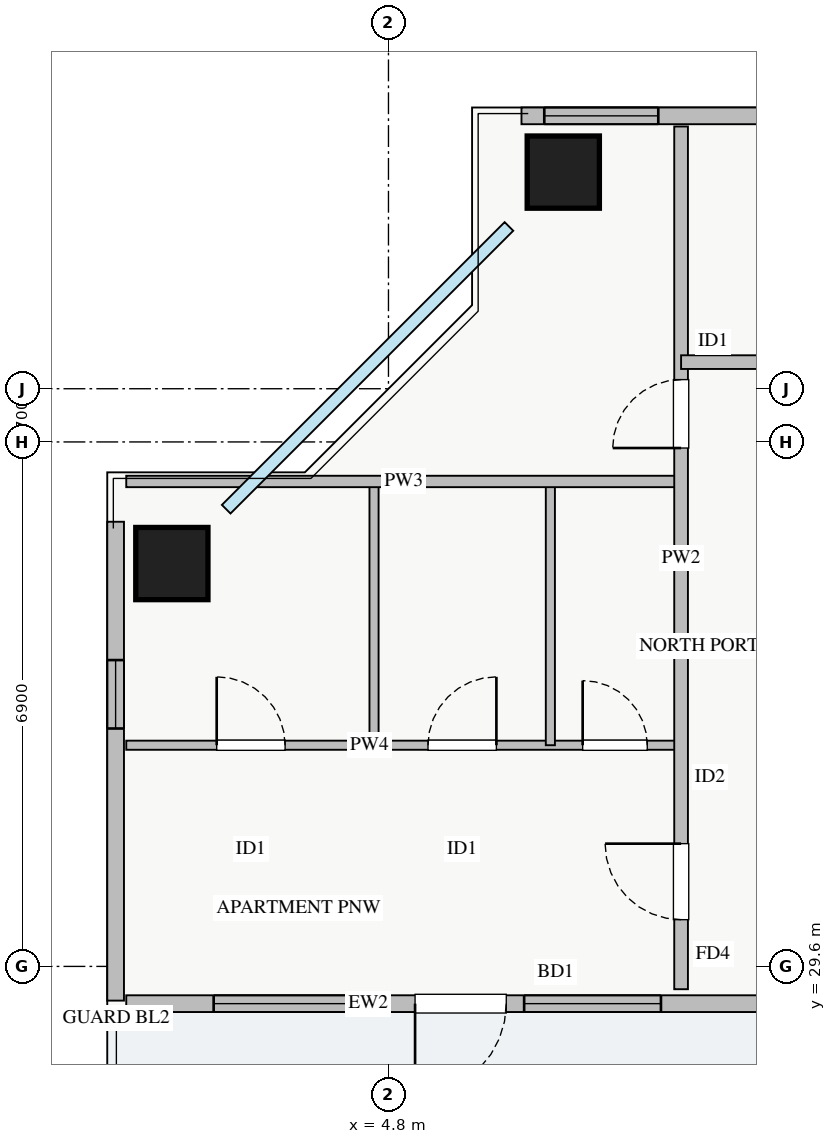
"""IFC4 building model, lengths in metres.
Left out: names, types, materials, properties, quantities, classifications, styles, units other than length and angle.
Written with IfcOpenShell. Run it as: python <this file> out.ifc"""

import sys

from ifc_helpers import new_model, si_unit, direction, frame, frame_2d, origin, origin_2d, place, context, subcontext, project, spatial, rectangle, extrude, source, transform, mapped, element, fill, save


model = new_model("IFC4")
c1 = context("Model", 3, precision=1e-05, world=origin(), true_north=direction((0.0, 1.0)))
c2 = subcontext(c1, "Body", "Model", "MODEL_VIEW")
j1 = project(units=[si_unit("LENGTHUNIT", "METRE"), si_unit("PLANEANGLEUNIT", "RADIAN")], contexts=[c1])
p1 = place(None, origin())
s1 = spatial("IfcSite", under=j1, at=p1, CompositionType="ELEMENT")
p2 = place(p1, origin())
s2 = spatial("IfcBuilding", under=s1, at=p2, CompositionType="ELEMENT")
p3 = place(p2, frame((0.0, 0.0, 153.5)))
s3 = spatial("IfcBuildingStorey", under=s2, at=p3, CompositionType="ELEMENT", Elevation=153.5)
m1 = source(origin(), c2, "Body", "SweptSolid", [
    extrude(rectangle(XDim=0.95, YDim=0.95, at=origin_2d()), origin(), (0.0, 0.0, 1.0), 3.25),
])
for number, where, z_axis, x_axis in (
    (1, (7.1, 40.05, 0.0), (0.0, 0.0, 1.0), (1.0, 0.0, 0.0)),
    (2, (1.95, 34.9, 0.0), (0.0, 0.0, 1.0), (1.0, 0.0, 0.0)),
):
    element("IfcColumn", number, at=place(p3, frame(where, z_axis=z_axis, x_axis=x_axis)), inside=s3, PredefinedType="COLUMN", context=c2, shape_type="MappedRepresentation", body=[
        mapped(m1, transform((0.0, 0.0, 0.0), x_axis=(1.0, 0.0, 0.0), y_axis=(0.0, 1.0, 0.0), z_axis=(0.0, 0.0, 1.0), scale=1.0)),
    ])
p4 = place(p3, frame((1.35, 29.11, 0.0), z_axis=(0.0, 0.0, 1.0), x_axis=(1.0, 0.0, 0.0)))
e3 = element("IfcWall", 3, at=p4, inside=s3, PredefinedType="STANDARD", context=c2, shape_type="SweptSolid", body=[
    extrude(rectangle(XDim=8.87, YDim=0.22, at=frame_2d((4.435, 0.0))), origin(), (0.0, 0.0, 1.0), 2.61),
])
p5 = place(p4, frame((3.8, 0.0, 0.0)))
e4 = element("IfcOpeningElement", 4, at=p5, cuts=e3, PredefinedType="OPENING", context=c2, shape_type="SweptSolid", body=[
    extrude(rectangle(XDim=1.2, YDim=2.1, at=frame_2d((0.6, 1.05))), frame((0.0, 0.12, 0.0), z_axis=(0.0, -1.0, 0.0), x_axis=(1.0, 0.0, 0.0)), (0.0, 0.0, 1.0), 0.24),
])
p6 = place(p4, frame((1.15, 0.0, 0.9)))
e5 = element("IfcOpeningElement", 5, at=p6, cuts=e3, PredefinedType="OPENING", context=c2, shape_type="SweptSolid", body=[
    extrude(rectangle(XDim=2.1, YDim=1.48, at=frame_2d((1.05, 0.74))), frame((0.0, 0.12, 0.0), z_axis=(0.0, -1.0, 0.0), x_axis=(1.0, 0.0, 0.0)), (0.0, 0.0, 1.0), 0.24),
])
p7 = place(p4, frame((5.235, 0.0, 0.9)))
e6 = element("IfcOpeningElement", 6, at=p7, cuts=e3, PredefinedType="OPENING", context=c2, shape_type="SweptSolid", body=[
    extrude(rectangle(XDim=1.8, YDim=1.5, at=frame_2d((0.9, 0.75))), frame((0.0, 0.12, 0.0), z_axis=(0.0, -1.0, 0.0), x_axis=(1.0, 0.0, 0.0)), (0.0, 0.0, 1.0), 0.24),
])
p8 = place(p3, frame((1.21, 29.15, 0.0), z_axis=(0.0, 0.0, 1.0), x_axis=(0.0, 1.0, 0.0)))
e7 = element("IfcWall", 7, at=p8, inside=s3, PredefinedType="STANDARD", context=c2, shape_type="SweptSolid", body=[
    extrude(rectangle(XDim=6.3, YDim=0.22, at=frame_2d((3.15, 0.0))), origin(), (0.0, 0.0, 1.0), 2.61),
])
p9 = place(p8, frame((3.58, 0.0, 0.9)))
e8 = element("IfcOpeningElement", 8, at=p9, cuts=e7, PredefinedType="OPENING", context=c2, shape_type="SweptSolid", body=[
    extrude(rectangle(XDim=0.9, YDim=1.2, at=frame_2d((0.45, 0.6))), frame((0.0, 0.12, 0.0), z_axis=(0.0, -1.0, 0.0), x_axis=(1.0, 0.0, 0.0)), (0.0, 0.0, 1.0), 0.24),
])
p10 = place(p3, frame((6.55, 40.79, 0.0), z_axis=(0.0, 0.0, 1.0), x_axis=(1.0, 0.0, 0.0)))
e9 = element("IfcWall", 9, at=p10, inside=s3, PredefinedType="STANDARD", context=c2, shape_type="SweptSolid", body=[
    extrude(rectangle(XDim=24.9, YDim=0.22, at=frame_2d((12.45, 0.0))), origin(), (0.0, 0.0, 1.0), 2.61),
])
p11 = place(p10, frame((0.3, 0.0, 0.9)))
e10 = element("IfcOpeningElement", 10, at=p11, cuts=e9, PredefinedType="OPENING", context=c2, shape_type="SweptSolid", body=[
    extrude(rectangle(XDim=1.5, YDim=1.5, at=frame_2d((0.75, 0.75))), frame((0.0, 0.12, 0.0), z_axis=(0.0, -1.0, 0.0), x_axis=(1.0, 0.0, 0.0)), (0.0, 0.0, 1.0), 0.24),
])
p12 = place(p10, frame((8.438, 0.0, 0.9)))
e11 = element("IfcOpeningElement", 11, at=p12, cuts=e9, PredefinedType="OPENING", context=c2, shape_type="SweptSolid", body=[
    extrude(rectangle(XDim=1.8, YDim=1.45, at=frame_2d((0.9, 0.725))), frame((0.0, 0.12, 0.0), z_axis=(0.0, -1.0, 0.0), x_axis=(1.0, 0.0, 0.0)), (0.0, 0.0, 1.0), 0.24),
])
p13 = place(p10, frame((14.813, 0.0, 0.9)))
e12 = element("IfcOpeningElement", 12, at=p13, cuts=e9, PredefinedType="OPENING", context=c2, shape_type="SweptSolid", body=[
    extrude(rectangle(XDim=1.5, YDim=1.45, at=frame_2d((0.75, 0.725))), frame((0.0, 0.12, 0.0), z_axis=(0.0, -1.0, 0.0), x_axis=(1.0, 0.0, 0.0)), (0.0, 0.0, 1.0), 0.24),
])
p14 = place(p10, frame((20.738, 0.0, 0.9)))
e13 = element("IfcOpeningElement", 13, at=p14, cuts=e9, PredefinedType="OPENING", context=c2, shape_type="SweptSolid", body=[
    extrude(rectangle(XDim=2.1, YDim=1.48, at=frame_2d((1.05, 0.74))), frame((0.0, 0.12, 0.0), z_axis=(0.0, -1.0, 0.0), x_axis=(1.0, 0.0, 0.0)), (0.0, 0.0, 1.0), 0.24),
])
p15 = place(p10, frame((4.094, 0.0, 0.9)))
e14 = element("IfcOpeningElement", 14, at=p15, cuts=e9, PredefinedType="OPENING", context=c2, shape_type="SweptSolid", body=[
    extrude(rectangle(XDim=2.4, YDim=1.5, at=frame_2d((1.2, 0.75))), frame((0.0, 0.12, 0.0), z_axis=(0.0, -1.0, 0.0), x_axis=(1.0, 0.0, 0.0)), (0.0, 0.0, 1.0), 0.24),
])
p16 = place(p3, frame((1.35, 32.51, 0.0), z_axis=(0.0, 0.0, 1.0), x_axis=(1.0, 0.0, 0.0)))
e15 = element("IfcWall", 15, at=p16, inside=s3, PredefinedType="PLUMBINGWALL", context=c2, shape_type="SweptSolid", body=[
    extrude(rectangle(XDim=7.3, YDim=0.12, at=frame_2d((3.65, 0.0))), origin(), (0.0, 0.0, 1.0), 3.07),
])
p17 = place(p16, frame((1.19, 0.0, 0.0)))
e16 = element("IfcOpeningElement", 16, at=p17, cuts=e15, PredefinedType="OPENING", context=c2, shape_type="SweptSolid", body=[
    extrude(rectangle(XDim=0.9, YDim=2.05, at=frame_2d((0.45, 1.025))), frame((0.0, 0.07, 0.0), z_axis=(0.0, -1.0, 0.0), x_axis=(1.0, 0.0, 0.0)), (0.0, 0.0, 1.0), 0.14),
])
p18 = place(p16, frame((3.97, 0.0, 0.0)))
e17 = element("IfcOpeningElement", 17, at=p18, cuts=e15, PredefinedType="OPENING", context=c2, shape_type="SweptSolid", body=[
    extrude(rectangle(XDim=0.9, YDim=2.05, at=frame_2d((0.45, 1.025))), frame((0.0, 0.07, 0.0), z_axis=(0.0, -1.0, 0.0), x_axis=(1.0, 0.0, 0.0)), (0.0, 0.0, 1.0), 0.14),
])
p19 = place(p16, frame((6.005, 0.0, 0.0)))
e18 = element("IfcOpeningElement", 18, at=p19, cuts=e15, PredefinedType="OPENING", context=c2, shape_type="SweptSolid", body=[
    extrude(rectangle(XDim=0.85, YDim=2.05, at=frame_2d((0.425, 1.025))), frame((0.0, 0.07, 0.0), z_axis=(0.0, -1.0, 0.0), x_axis=(1.0, 0.0, 0.0)), (0.0, 0.0, 1.0), 0.14),
])
p20 = place(p3, frame((4.61, 32.51, 0.0), z_axis=(0.0, 0.0, 1.0), x_axis=(0.0, 1.0, 0.0)))
e19 = element("IfcWall", 19, at=p20, inside=s3, PredefinedType="PLUMBINGWALL", context=c2, shape_type="SweptSolid", body=[
    extrude(rectangle(XDim=3.47, YDim=0.12, at=frame_2d((1.735, 0.0))), origin(), (0.0, 0.0, 1.0), 3.07),
])
p21 = place(p3, frame((6.93, 32.51, 0.0), z_axis=(0.0, 0.0, 1.0), x_axis=(0.0, 1.0, 0.0)))
e20 = element("IfcWall", 20, at=p21, inside=s3, PredefinedType="PLUMBINGWALL", context=c2, shape_type="SweptSolid", body=[
    extrude(rectangle(XDim=3.47, YDim=0.12, at=frame_2d((1.735, 0.0))), origin(), (0.0, 0.0, 1.0), 2.577),
])
p22 = place(p3, frame((1.35, 35.98, 0.0), z_axis=(0.0, 0.0, 1.0), x_axis=(1.0, 0.0, 0.0)))
e21 = element("IfcWall", 21, at=p22, inside=s3, PredefinedType="PARTITIONING", context=c2, shape_type="SweptSolid", body=[
    extrude(rectangle(XDim=7.3, YDim=0.15, at=frame_2d((3.65, 0.0))), origin(), (0.0, 0.0, 1.0), 3.07),
])
p23 = place(p3, frame((8.65, 29.3, 0.0), z_axis=(0.0, 0.0, 1.0), x_axis=(0.0, 1.0, 0.0)))
e22 = element("IfcWall", 22, at=p23, inside=s3, PredefinedType="PARTITIONING", context=c2, shape_type="SweptSolid", body=[
    extrude(rectangle(XDim=11.35, YDim=0.18, at=frame_2d((5.675, 0.0))), origin(), (0.0, 0.0, 1.0), 3.07),
])
p24 = place(p23, frame((0.915, 0.0, 0.0)))
e23 = element("IfcOpeningElement", 23, at=p24, cuts=e22, PredefinedType="OPENING", context=c2, shape_type="SweptSolid", body=[
    extrude(rectangle(XDim=1.0, YDim=2.05, at=frame_2d((0.5, 1.025))), frame((0.0, 0.1, 0.0), z_axis=(0.0, -1.0, 0.0), x_axis=(1.0, 0.0, 0.0)), (0.0, 0.0, 1.0), 0.2),
])
p25 = place(p23, frame((7.12, 0.0, 0.0)))
e24 = element("IfcOpeningElement", 24, at=p25, cuts=e22, PredefinedType="OPENING", context=c2, shape_type="SweptSolid", body=[
    extrude(rectangle(XDim=0.9, YDim=2.05, at=frame_2d((0.45, 1.025))), frame((0.0, 0.1, 0.0), z_axis=(0.0, -1.0, 0.0), x_axis=(1.0, 0.0, 0.0)), (0.0, 0.0, 1.0), 0.2),
])
p26 = place(p3, frame((8.65, 37.55, 0.0), z_axis=(0.0, 0.0, 1.0), x_axis=(1.0, 0.0, 0.0)))
e25 = element("IfcWall", 25, at=p26, inside=s3, PredefinedType="PARTITIONING", context=c2, shape_type="SweptSolid", body=[
    extrude(rectangle(XDim=23.8, YDim=0.18, at=frame_2d((11.9, 0.0))), origin(), (0.0, 0.0, 1.0), 3.07),
])
p27 = place(p26, frame((5.425, 0.0, 0.0)))
e26 = element("IfcOpeningElement", 26, at=p27, cuts=e25, PredefinedType="OPENING", context=c2, shape_type="SweptSolid", body=[
    extrude(rectangle(XDim=1.0, YDim=2.05, at=frame_2d((0.5, 1.025))), frame((0.0, 0.1, 0.0), z_axis=(0.0, -1.0, 0.0), x_axis=(1.0, 0.0, 0.0)), (0.0, 0.0, 1.0), 0.2),
])
p28 = place(p26, frame((17.325, 0.0, 0.0)))
e27 = element("IfcOpeningElement", 27, at=p28, cuts=e25, PredefinedType="OPENING", context=c2, shape_type="SweptSolid", body=[
    extrude(rectangle(XDim=1.0, YDim=2.05, at=frame_2d((0.5, 1.025))), frame((0.0, 0.1, 0.0), z_axis=(0.0, -1.0, 0.0), x_axis=(1.0, 0.0, 0.0)), (0.0, 0.0, 1.0), 0.2),
])
m2 = source(origin(), c2, "Body", "SweptSolid", [
    extrude(rectangle(XDim=1.2, YDim=2.1, at=frame_2d((0.6, 1.05))), frame((0.0, 0.025, 0.0), z_axis=(0.0, -1.0, 0.0), x_axis=(1.0, 0.0, 0.0)), (0.0, 0.0, 1.0), 0.05),
])
p29 = place(p5, frame((1.2, 0.0, 0.0), z_axis=(0.0, 0.0, 1.0), x_axis=(-1.0, 0.0, 0.0)))
e28 = element("IfcDoor", 28, at=p29, inside=s3, OperationType="SINGLE_SWING_LEFT", PredefinedType="DOOR", context=c2, shape_type="MappedRepresentation", body=[
    mapped(m2, transform((0.0, 0.0, 0.0), x_axis=(1.0, 0.0, 0.0), y_axis=(0.0, 1.0, 0.0), z_axis=(0.0, 0.0, 1.0), scale=1.0)),
])
fill(e4, e28)
m3 = source(origin(), c2, "Body", "SweptSolid", [
    extrude(rectangle(XDim=2.1, YDim=1.48, at=frame_2d((1.05, 0.74))), frame((0.0, 0.03, 0.0), z_axis=(0.0, -1.0, 0.0), x_axis=(1.0, 0.0, 0.0)), (0.0, 0.0, 1.0), 0.06),
])
p30 = place(p6, origin())
e29 = element("IfcWindow", 29, at=p30, inside=s3, PartitioningType="TRIPLE_PANEL_VERTICAL", PredefinedType="WINDOW", context=c2, shape_type="MappedRepresentation", body=[
    mapped(m3, transform((0.0, 0.0, 0.0), x_axis=(1.0, 0.0, 0.0), y_axis=(0.0, 1.0, 0.0), z_axis=(0.0, 0.0, 1.0), scale=1.0)),
])
fill(e5, e29)
m4 = source(origin(), c2, "Body", "SweptSolid", [
    extrude(rectangle(XDim=1.8, YDim=1.5, at=frame_2d((0.9, 0.75))), frame((0.0, 0.03, 0.0), z_axis=(0.0, -1.0, 0.0), x_axis=(1.0, 0.0, 0.0)), (0.0, 0.0, 1.0), 0.06),
])
p31 = place(p7, origin())
e30 = element("IfcWindow", 30, at=p31, inside=s3, PartitioningType="TRIPLE_PANEL_VERTICAL", PredefinedType="WINDOW", context=c2, shape_type="MappedRepresentation", body=[
    mapped(m4, transform((0.0, 0.0, 0.0), x_axis=(1.0, 0.0, 0.0), y_axis=(0.0, 1.0, 0.0), z_axis=(0.0, 0.0, 1.0), scale=1.0)),
])
fill(e6, e30)
m5 = source(origin(), c2, "Body", "SweptSolid", [
    extrude(rectangle(XDim=1.5, YDim=1.5, at=frame_2d((0.75, 0.75))), frame((0.0, 0.03, 0.0), z_axis=(0.0, -1.0, 0.0), x_axis=(1.0, 0.0, 0.0)), (0.0, 0.0, 1.0), 0.06),
])
p32 = place(p11, origin())
e31 = element("IfcWindow", 31, at=p32, inside=s3, PartitioningType="TRIPLE_PANEL_VERTICAL", PredefinedType="WINDOW", context=c2, shape_type="MappedRepresentation", body=[
    mapped(m5, transform((0.0, 0.0, 0.0), x_axis=(1.0, 0.0, 0.0), y_axis=(0.0, 1.0, 0.0), z_axis=(0.0, 0.0, 1.0), scale=1.0)),
])
fill(e10, e31)
m6 = source(origin(), c2, "Body", "SweptSolid", [
    extrude(rectangle(XDim=0.9, YDim=2.05, at=frame_2d((0.45, 1.025))), frame((0.0, 0.025, 0.0), z_axis=(0.0, -1.0, 0.0), x_axis=(1.0, 0.0, 0.0)), (0.0, 0.0, 1.0), 0.05),
])
p33 = place(p17, origin())
e32 = element("IfcDoor", 32, at=p33, inside=s3, OperationType="SINGLE_SWING_LEFT", PredefinedType="DOOR", context=c2, shape_type="MappedRepresentation", body=[
    mapped(m6, transform((0.0, 0.0, 0.0), x_axis=(1.0, 0.0, 0.0), y_axis=(0.0, 1.0, 0.0), z_axis=(0.0, 0.0, 1.0), scale=1.0)),
])
fill(e16, e32)
p34 = place(p18, origin())
e33 = element("IfcDoor", 33, at=p34, inside=s3, OperationType="SINGLE_SWING_RIGHT", PredefinedType="DOOR", context=c2, shape_type="MappedRepresentation", body=[
    mapped(m6, transform((0.0, 0.0, 0.0), x_axis=(1.0, 0.0, 0.0), y_axis=(0.0, 1.0, 0.0), z_axis=(0.0, 0.0, 1.0), scale=1.0)),
])
fill(e17, e33)
m7 = source(origin(), c2, "Body", "SweptSolid", [
    extrude(rectangle(XDim=0.85, YDim=2.05, at=frame_2d((0.425, 1.025))), frame((0.0, 0.025, 0.0), z_axis=(0.0, -1.0, 0.0), x_axis=(1.0, 0.0, 0.0)), (0.0, 0.0, 1.0), 0.05),
])
p35 = place(p19, origin())
e34 = element("IfcDoor", 34, at=p35, inside=s3, OperationType="SINGLE_SWING_LEFT", PredefinedType="DOOR", context=c2, shape_type="MappedRepresentation", body=[
    mapped(m7, transform((0.0, 0.0, 0.0), x_axis=(1.0, 0.0, 0.0), y_axis=(0.0, 1.0, 0.0), z_axis=(0.0, 0.0, 1.0), scale=1.0)),
])
fill(e18, e34)
m8 = source(origin(), c2, "Body", "SweptSolid", [
    extrude(rectangle(XDim=1.0, YDim=2.05, at=frame_2d((0.5, 1.025))), frame((0.0, 0.025, 0.0), z_axis=(0.0, -1.0, 0.0), x_axis=(1.0, 0.0, 0.0)), (0.0, 0.0, 1.0), 0.05),
])
p36 = place(p24, origin())
e35 = element("IfcDoor", 35, at=p36, inside=s3, OperationType="SINGLE_SWING_RIGHT", PredefinedType="DOOR", context=c2, shape_type="MappedRepresentation", body=[
    mapped(m8, transform((0.0, 0.0, 0.0), x_axis=(1.0, 0.0, 0.0), y_axis=(0.0, 1.0, 0.0), z_axis=(0.0, 0.0, 1.0), scale=1.0)),
])
fill(e23, e35)
p37 = place(p25, origin())
e36 = element("IfcDoor", 36, at=p37, inside=s3, OperationType="SINGLE_SWING_LEFT", PredefinedType="DOOR", context=c2, shape_type="MappedRepresentation", body=[
    mapped(m6, transform((0.0, 0.0, 0.0), x_axis=(1.0, 0.0, 0.0), y_axis=(0.0, 1.0, 0.0), z_axis=(0.0, 0.0, 1.0), scale=1.0)),
])
fill(e24, e36)
m9 = source(origin(), c2, "Body", "SweptSolid", [
    extrude(rectangle(XDim=0.9, YDim=1.2, at=frame_2d((0.45, 0.6))), frame((0.0, 0.03, 0.0), z_axis=(0.0, -1.0, 0.0), x_axis=(1.0, 0.0, 0.0)), (0.0, 0.0, 1.0), 0.06),
])
p38 = place(p9, origin())
e37 = element("IfcWindow", 37, at=p38, inside=s3, PartitioningType="SINGLE_PANEL", PredefinedType="WINDOW", context=c2, shape_type="MappedRepresentation", body=[
    mapped(m9, transform((0.0, 0.0, 0.0), x_axis=(1.0, 0.0, 0.0), y_axis=(0.0, 1.0, 0.0), z_axis=(0.0, 0.0, 1.0), scale=1.0)),
])
fill(e8, e37)
save(model, sys.argv[1])
